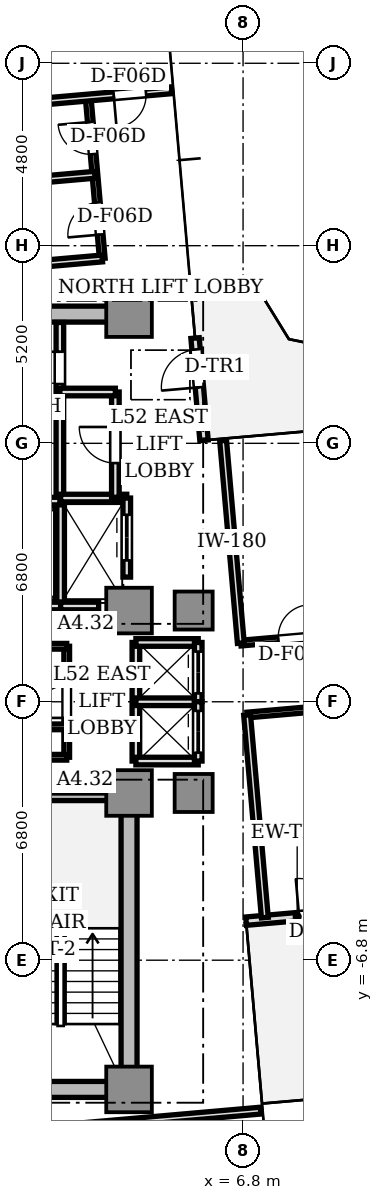
"""IFC4 building model, lengths in metres.
Left out: names, types, materials, properties, quantities, classifications, styles, units other than length and angle.
Written with IfcOpenShell. Run it as: python <this file> out.ifc"""

import sys

from ifc_helpers import new_model, si_unit, direction, frame, frame_2d, origin, origin_2d, place, context, subcontext, project, spatial, rectangle, extrude, source, transform, mapped, element, fill, save


model = new_model("IFC4")
c1 = context("Model", 3, precision=1e-05, world=origin(), true_north=direction((0.0, 1.0)))
c2 = subcontext(c1, "Body", "Model", "MODEL_VIEW")
j1 = project(units=[si_unit("LENGTHUNIT", "METRE"), si_unit("PLANEANGLEUNIT", "RADIAN")], contexts=[c1])
p1 = place(None, origin())
s1 = spatial("IfcSite", under=j1, at=p1, CompositionType="ELEMENT")
p2 = place(p1, origin())
s2 = spatial("IfcBuilding", under=s1, at=p2, CompositionType="ELEMENT")
p3 = place(p2, frame((0.0, 0.0, 188.6)))
s3 = spatial("IfcBuildingStorey", under=s2, at=p3, CompositionType="ELEMENT", Elevation=188.6)
for number, where, z_axis, x_axis in (
    (1, (-3.55, 10.2, 0.0), (0.0, 0.0, 1.0), (1.0, 0.0, 0.0)),
    (2, (-3.55, -10.2, 0.0), (0.0, 0.0, 1.0), (1.0, 0.0, 0.0)),
):
    element("IfcWall", number, at=place(p3, frame(where, z_axis=z_axis, x_axis=x_axis)), inside=s3, PredefinedType="SHEAR", context=c2, shape_type="SweptSolid", body=[
        extrude(rectangle(XDim=7.1, YDim=0.42, at=frame_2d((3.55, 0.0))), origin(), (0.0, 0.0, 1.0), 3.11),
    ])
p4 = place(p3, frame((3.8, -9.75, 0.0), z_axis=(0.0, 0.0, 1.0), x_axis=(0.0, 1.0, 0.0)))
e3 = element("IfcWall", 3, at=p4, inside=s3, PredefinedType="SHEAR", context=c2, shape_type="SweptSolid", body=[
    extrude(rectangle(XDim=6.9, YDim=0.42, at=frame_2d((3.45, 0.0))), origin(), (0.0, 0.0, 1.0), 3.11),
])
m1 = source(origin(), c2, "Body", "SweptSolid", [
    extrude(rectangle(XDim=1.2, YDim=1.2, at=origin_2d()), origin(), (0.0, 0.0, 1.0), 3.11),
])
for number, where, z_axis, x_axis in (
    (4, (3.8, 2.4, 0.0), (0.0, 0.0, 1.0), (1.0, 0.0, 0.0)),
    (5, (3.8, 10.2, 0.0), (0.0, 0.0, 1.0), (1.0, 0.0, 0.0)),
    (6, (3.8, -2.4, 0.0), (0.0, 0.0, 1.0), (1.0, 0.0, 0.0)),
    (7, (3.8, -10.2, 0.0), (0.0, 0.0, 1.0), (1.0, 0.0, 0.0)),
):
    element("IfcColumn", number, at=place(p3, frame(where, z_axis=z_axis, x_axis=x_axis)), inside=s3, PredefinedType="COLUMN", context=c2, shape_type="MappedRepresentation", body=[
        mapped(m1, transform((0.0, 0.0, 0.0), scale=1.0)),
    ])
m2 = source(origin(), c2, "Body", "SweptSolid", [
    extrude(rectangle(XDim=1.0, YDim=1.0, at=origin_2d()), origin(), (0.0, 0.0, 1.0), 3.11),
])
for number, where, z_axis, x_axis in (
    (8, (5.5, 2.4, 0.0), (0.0, 0.0, 1.0), (1.0, 0.0, 0.0)),
    (9, (5.5, -2.4, 0.0), (0.0, 0.0, 1.0), (1.0, 0.0, 0.0)),
):
    element("IfcColumn", number, at=place(p3, frame(where, z_axis=z_axis, x_axis=x_axis)), inside=s3, PredefinedType="COLUMN", context=c2, shape_type="MappedRepresentation", body=[
        mapped(m2, transform((0.0, 0.0, 0.0), scale=1.0)),
    ])
p5 = place(p3, frame((6.879, -5.772, 0.0), z_axis=(0.0, 0.0, 1.0), x_axis=(0.996193619346, 0.087168071984, 0.0)))
e10 = element("IfcWall", 10, at=p5, inside=s3, PredefinedType="STANDARD", context=c2, shape_type="SweptSolid", body=[
    extrude(rectangle(XDim=2.7, YDim=0.22, at=frame_2d((1.35, 0.0))), origin(), (0.0, 0.0, 1.0), 3.11),
])
p6 = place(p5, frame((1.4, 0.0, 0.0)))
e11 = element("IfcOpeningElement", 11, at=p6, cuts=e10, PredefinedType="OPENING", context=c2, shape_type="SweptSolid", body=[
    extrude(rectangle(XDim=1.0, YDim=2.2, at=frame_2d((0.5, 1.1))), frame((0.0, 0.12, 0.0), z_axis=(0.0, -1.0, 0.0), x_axis=(1.0, 0.0, 0.0)), (0.0, 0.0, 1.0), 0.24),
])
p7 = place(p3, frame((5.772, 6.879, 0.0), z_axis=(0.0, 0.0, 1.0), x_axis=(-0.087168071984, 0.996193619346, 0.0)))
e12 = element("IfcWall", 12, at=p7, inside=s3, PredefinedType="STANDARD", context=c2, shape_type="SweptSolid", body=[
    extrude(rectangle(XDim=2.7, YDim=0.22, at=frame_2d((1.35, 0.0))), origin(), (0.0, 0.0, 1.0), 3.11),
])
p8 = place(p7, frame((1.4, 0.0, 0.0)))
e13 = element("IfcOpeningElement", 13, at=p8, cuts=e12, PredefinedType="OPENING", context=c2, shape_type="SweptSolid", body=[
    extrude(rectangle(XDim=1.0, YDim=2.2, at=frame_2d((0.5, 1.1))), frame((0.0, 0.12, 0.0), z_axis=(0.0, -1.0, 0.0), x_axis=(1.0, 0.0, 0.0)), (0.0, 0.0, 1.0), 0.24),
])
p9 = place(p3, frame((0.0, -2.5, 0.0), z_axis=(0.0, 0.0, 1.0), x_axis=(1.0, 0.0, 0.0)))
e14 = element("IfcWall", 14, at=p9, inside=s3, PredefinedType="SOLIDWALL", context=c2, shape_type="SweptSolid", body=[
    extrude(rectangle(XDim=3.72, YDim=0.2, at=frame_2d((1.86, 0.0))), origin(), (0.0, 0.0, 1.0), 3.11),
])
p10 = place(p3, frame((1.98, 5.32, 0.0), z_axis=(0.0, 0.0, 1.0), x_axis=(0.0, 1.0, 0.0)))
e15 = element("IfcWall", 15, at=p10, inside=s3, PredefinedType="SOLIDWALL", context=c2, shape_type="SweptSolid", body=[
    extrude(rectangle(XDim=4.66, YDim=0.2, at=frame_2d((2.33, 0.0))), origin(), (0.0, 0.0, 1.0), 2.66),
])
p11 = place(p10, frame((3.04, 0.0, 0.0)))
e16 = element("IfcOpeningElement", 16, at=p11, cuts=e15, PredefinedType="OPENING", context=c2, shape_type="SweptSolid", body=[
    extrude(rectangle(XDim=0.85, YDim=2.1, at=frame_2d((0.425, 1.05))), frame((0.0, 0.11, 0.0), z_axis=(0.0, -1.0, 0.0), x_axis=(1.0, 0.0, 0.0)), (0.0, 0.0, 1.0), 0.22),
])
p12 = place(p3, frame((2.0, 2.5, 0.0), z_axis=(0.0, 0.0, 1.0), x_axis=(0.0, 1.0, 0.0)))
e17 = element("IfcWall", 17, at=p12, inside=s3, PredefinedType="SOLIDWALL", context=c2, shape_type="SweptSolid", body=[
    extrude(rectangle(XDim=2.78, YDim=0.2, at=frame_2d((1.39, 0.0))), origin(), (0.0, 0.0, 1.0), 2.66),
])
p13 = place(p3, frame((0.05, 2.52, 0.0), z_axis=(0.0, 0.0, 1.0), x_axis=(1.0, 0.0, 0.0)))
e18 = element("IfcWall", 18, at=p13, inside=s3, PredefinedType="SOLIDWALL", context=c2, shape_type="SweptSolid", body=[
    extrude(rectangle(XDim=1.95, YDim=0.2, at=frame_2d((0.975, 0.0))), origin(), (0.0, 0.0, 1.0), 2.66),
])
p14 = place(p3, frame((0.05, 5.28, 0.0), z_axis=(0.0, 0.0, 1.0), x_axis=(1.0, 0.0, 0.0)))
e19 = element("IfcWall", 19, at=p14, inside=s3, PredefinedType="SOLIDWALL", context=c2, shape_type="SweptSolid", body=[
    extrude(rectangle(XDim=1.93, YDim=0.2, at=frame_2d((0.965, 0.0))), origin(), (0.0, 0.0, 1.0), 2.66),
])
p15 = place(p14, frame((0.4, 0.0, 0.0)))
e20 = element("IfcOpeningElement", 20, at=p15, cuts=e19, PredefinedType="OPENING", context=c2, shape_type="SweptSolid", body=[
    extrude(rectangle(XDim=1.1, YDim=2.2, at=frame_2d((0.55, 1.1))), frame((0.0, 0.11, 0.0), z_axis=(0.0, -1.0, 0.0), x_axis=(1.0, 0.0, 0.0)), (0.0, 0.0, 1.0), 0.22),
])
p16 = place(p3, frame((2.0, 2.52, 0.0), z_axis=(0.0, 0.0, 1.0), x_axis=(1.0, 0.0, 0.0)))
e21 = element("IfcWall", 21, at=p16, inside=s3, PredefinedType="SOLIDWALL", context=c2, shape_type="SweptSolid", body=[
    extrude(rectangle(XDim=1.0, YDim=0.2, at=frame_2d((0.5, 0.0))), origin(), (0.0, 0.0, 1.0), 2.66),
])
p17 = place(p3, frame((2.0, 5.36, 0.0), z_axis=(0.0, 0.0, 1.0), x_axis=(1.0, 0.0, 0.0)))
e22 = element("IfcWall", 22, at=p17, inside=s3, PredefinedType="SOLIDWALL", context=c2, shape_type="SweptSolid", body=[
    extrude(rectangle(XDim=1.74, YDim=0.2, at=frame_2d((0.87, 0.0))), origin(), (0.0, 0.0, 1.0), 2.66),
])
p18 = place(p3, frame((3.74, 3.28, 0.0), z_axis=(0.0, 0.0, 1.0), x_axis=(0.0, 1.0, 0.0)))
e23 = element("IfcWall", 23, at=p18, inside=s3, PredefinedType="SOLIDWALL", context=c2, shape_type="SweptSolid", body=[
    extrude(rectangle(XDim=2.08, YDim=0.2, at=frame_2d((1.04, 0.0))), origin(), (0.0, 0.0, 1.0), 2.66),
])
p19 = place(p18, frame((0.44, 0.0, 0.0)))
e24 = element("IfcOpeningElement", 24, at=p19, cuts=e23, PredefinedType="OPENING", context=c2, shape_type="SweptSolid", body=[
    extrude(rectangle(XDim=1.2, YDim=2.2, at=frame_2d((0.6, 1.1))), frame((0.0, 0.11, 0.0), z_axis=(0.0, -1.0, 0.0), x_axis=(1.0, 0.0, 0.0)), (0.0, 0.0, 1.0), 0.22),
])
p20 = place(p3, frame((3.98, -1.56, 0.0), z_axis=(0.0, 0.0, 1.0), x_axis=(0.0, 1.0, 0.0)))
e25 = element("IfcWall", 25, at=p20, inside=s3, PredefinedType="SOLIDWALL", context=c2, shape_type="SweptSolid", body=[
    extrude(rectangle(XDim=3.12, YDim=0.2, at=frame_2d((1.56, 0.0))), origin(), (0.0, 0.0, 1.0), 2.28),
])
for number, where, z_axis, x_axis in (
    (26, (3.98, 1.56, 0.0), (0.0, 0.0, 1.0), (1.0, 0.0, 0.0)),
    (27, (3.98, -1.56, 0.0), (0.0, 0.0, 1.0), (1.0, 0.0, 0.0)),
    (28, (3.98, 0.0, 0.0), (0.0, 0.0, 1.0), (1.0, 0.0, 0.0)),
):
    element("IfcWall", number, at=place(p3, frame(where, z_axis=z_axis, x_axis=x_axis)), inside=s3, PredefinedType="SOLIDWALL", context=c2, shape_type="SweptSolid", body=[
        extrude(rectangle(XDim=1.64, YDim=0.2, at=frame_2d((0.82, 0.0))), origin(), (0.0, 0.0, 1.0), 2.66),
    ])
p21 = place(p3, frame((5.62, 0.0, 0.0), z_axis=(0.0, 0.0, 1.0), x_axis=(0.0, 1.0, 0.0)))
e29 = element("IfcWall", 29, at=p21, inside=s3, PredefinedType="SOLIDWALL", context=c2, shape_type="SweptSolid", body=[
    extrude(rectangle(XDim=1.56, YDim=0.2, at=frame_2d((0.78, 0.0))), origin(), (0.0, 0.0, 1.0), 2.66),
])
p22 = place(p21, frame((0.22, 0.0, 0.0)))
e30 = element("IfcOpeningElement", 30, at=p22, cuts=e29, PredefinedType="OPENING", context=c2, shape_type="SweptSolid", body=[
    extrude(rectangle(XDim=1.1, YDim=2.2, at=frame_2d((0.55, 1.1))), frame((0.0, 0.11, 0.0), z_axis=(0.0, -1.0, 0.0), x_axis=(1.0, 0.0, 0.0)), (0.0, 0.0, 1.0), 0.22),
])
p23 = place(p3, frame((5.62, -1.56, 0.0), z_axis=(0.0, 0.0, 1.0), x_axis=(0.0, 1.0, 0.0)))
e31 = element("IfcWall", 31, at=p23, inside=s3, PredefinedType="SOLIDWALL", context=c2, shape_type="SweptSolid", body=[
    extrude(rectangle(XDim=1.56, YDim=0.2, at=frame_2d((0.78, 0.0))), origin(), (0.0, 0.0, 1.0), 2.66),
])
p24 = place(p23, frame((0.22, 0.0, 0.0)))
e32 = element("IfcOpeningElement", 32, at=p24, cuts=e31, PredefinedType="OPENING", context=c2, shape_type="SweptSolid", body=[
    extrude(rectangle(XDim=1.1, YDim=2.2, at=frame_2d((0.55, 1.1))), frame((0.0, 0.11, 0.0), z_axis=(0.0, -1.0, 0.0), x_axis=(1.0, 0.0, 0.0)), (0.0, 0.0, 1.0), 0.22),
])
p25 = place(p3, frame((3.44, 5.38, 0.0), z_axis=(0.0, 0.0, 1.0), x_axis=(0.0, 1.0, 0.0)))
e33 = element("IfcWall", 33, at=p25, inside=s3, PredefinedType="SOLIDWALL", context=c2, shape_type="SweptSolid", body=[
    extrude(rectangle(XDim=2.77, YDim=0.2, at=frame_2d((1.385, 0.0))), origin(), (0.0, 0.0, 1.0), 2.66),
])
p26 = place(p25, frame((0.9, 0.0, 0.0)))
e34 = element("IfcOpeningElement", 34, at=p26, cuts=e33, PredefinedType="OPENING", context=c2, shape_type="SweptSolid", body=[
    extrude(rectangle(XDim=0.95, YDim=2.15, at=frame_2d((0.475, 1.075))), frame((0.0, 0.11, 0.0), z_axis=(0.0, -1.0, 0.0), x_axis=(1.0, 0.0, 0.0)), (0.0, 0.0, 1.0), 0.22),
])
p27 = place(p3, frame((1.98, 8.15, 0.0), z_axis=(0.0, 0.0, 1.0), x_axis=(1.0, 0.0, 0.0)))
e35 = element("IfcWall", 35, at=p27, inside=s3, PredefinedType="SOLIDWALL", context=c2, shape_type="SweptSolid", body=[
    extrude(rectangle(XDim=1.46, YDim=0.2, at=frame_2d((0.73, 0.0))), origin(), (0.0, 0.0, 1.0), 2.66),
])
p28 = place(p3, frame((2.16, -1.46, 0.0), z_axis=(0.0, 0.0, 1.0), x_axis=(0.0, 1.0, 0.0)))
e36 = element("IfcWall", 36, at=p28, inside=s3, PredefinedType="PARTITIONING", context=c2, shape_type="SweptSolid", body=[
    extrude(rectangle(XDim=2.92, YDim=0.15, at=frame_2d((1.46, 0.0))), origin(), (0.0, 0.0, 1.0), 2.66),
])
p29 = place(p28, frame((1.035, 0.0, 0.0)))
e37 = element("IfcOpeningElement", 37, at=p29, cuts=e36, PredefinedType="OPENING", context=c2, shape_type="SweptSolid", body=[
    extrude(rectangle(XDim=0.85, YDim=2.1, at=frame_2d((0.425, 1.05))), frame((0.0, 0.085, 0.0), z_axis=(0.0, -1.0, 0.0), x_axis=(1.0, 0.0, 0.0)), (0.0, 0.0, 1.0), 0.17),
])
p30 = place(p3, frame((-2.16, 1.46, 0.0), z_axis=(0.0, 0.0, 1.0), x_axis=(1.0, 0.0, 0.0)))
e38 = element("IfcWall", 38, at=p30, inside=s3, PredefinedType="PARTITIONING", context=c2, shape_type="SweptSolid", body=[
    extrude(rectangle(XDim=4.32, YDim=0.15, at=frame_2d((2.16, 0.0))), origin(), (0.0, 0.0, 1.0), 2.66),
])
p31 = place(p30, frame((1.73, 0.0, 0.0)))
e39 = element("IfcOpeningElement", 39, at=p31, cuts=e38, PredefinedType="OPENING", context=c2, shape_type="SweptSolid", body=[
    extrude(rectangle(XDim=0.85, YDim=2.1, at=frame_2d((0.425, 1.05))), frame((0.0, 0.085, 0.0), z_axis=(0.0, -1.0, 0.0), x_axis=(1.0, 0.0, 0.0)), (0.0, 0.0, 1.0), 0.17),
])
p32 = place(p3, frame((-2.16, -1.46, 0.0), z_axis=(0.0, 0.0, 1.0), x_axis=(1.0, 0.0, 0.0)))
e40 = element("IfcWall", 40, at=p32, inside=s3, PredefinedType="PARTITIONING", context=c2, shape_type="SweptSolid", body=[
    extrude(rectangle(XDim=4.32, YDim=0.15, at=frame_2d((2.16, 0.0))), origin(), (0.0, 0.0, 1.0), 2.66),
])
p33 = place(p32, frame((1.73, 0.0, 0.0)))
e41 = element("IfcOpeningElement", 41, at=p33, cuts=e40, PredefinedType="OPENING", context=c2, shape_type="SweptSolid", body=[
    extrude(rectangle(XDim=0.85, YDim=2.1, at=frame_2d((0.425, 1.05))), frame((0.0, 0.085, 0.0), z_axis=(0.0, -1.0, 0.0), x_axis=(1.0, 0.0, 0.0)), (0.0, 0.0, 1.0), 0.17),
])
for number, where, z_axis, x_axis in (
    (42, (-2.16, 0.66, 0.0), (0.0, 0.0, 1.0), (1.0, 0.0, 0.0)),
    (43, (-2.16, -0.66, 0.0), (0.0, 0.0, 1.0), (1.0, 0.0, 0.0)),
):
    element("IfcWall", number, at=place(p3, frame(where, z_axis=z_axis, x_axis=x_axis)), inside=s3, PredefinedType="PARTITIONING", context=c2, shape_type="SweptSolid", body=[
        extrude(rectangle(XDim=4.32, YDim=0.15, at=frame_2d((2.16, 0.0))), origin(), (0.0, 0.0, 1.0), 2.66),
    ])
p34 = place(p3, frame((6.741, 1.543, 0.0), z_axis=(0.0, 0.0, 1.0), x_axis=(0.996195062465, 0.087151577845, 0.0)))
e44 = element("IfcWall", 44, at=p34, inside=s3, PredefinedType="PARTITIONING", context=c2, shape_type="SweptSolid", body=[
    extrude(rectangle(XDim=13.2, YDim=0.15, at=frame_2d((6.6, 0.0))), origin(), (0.0, 0.0, 1.0), 2.66),
])
p35 = place(p34, frame((0.992, 0.0, 0.0)))
e45 = element("IfcOpeningElement", 45, at=p35, cuts=e44, PredefinedType="OPENING", context=c2, shape_type="SweptSolid", body=[
    extrude(rectangle(XDim=0.85, YDim=2.1, at=frame_2d((0.425, 1.05))), frame((0.0, 0.085, 0.0), z_axis=(0.0, -1.0, 0.0), x_axis=(1.0, 0.0, 0.0)), (0.0, 0.0, 1.0), 0.17),
])
p36 = place(p34, frame((7.342, 0.0, 0.0)))
e46 = element("IfcOpeningElement", 46, at=p36, cuts=e44, PredefinedType="OPENING", context=c2, shape_type="SweptSolid", body=[
    extrude(rectangle(XDim=0.85, YDim=2.1, at=frame_2d((0.425, 1.05))), frame((0.0, 0.085, 0.0), z_axis=(0.0, -1.0, 0.0), x_axis=(1.0, 0.0, 0.0)), (0.0, 0.0, 1.0), 0.17),
])
p37 = place(p3, frame((6.907, -0.349, 0.0), z_axis=(0.0, 0.0, 1.0), x_axis=(0.996195062465, 0.087151577845, 0.0)))
e47 = element("IfcWall", 47, at=p37, inside=s3, PredefinedType="PARTITIONING", context=c2, shape_type="SweptSolid", body=[
    extrude(rectangle(XDim=13.2, YDim=0.15, at=frame_2d((6.6, 0.0))), origin(), (0.0, 0.0, 1.0), 2.66),
])
p38 = place(p37, frame((2.458, 0.0, 0.0)))
e48 = element("IfcOpeningElement", 48, at=p38, cuts=e47, PredefinedType="OPENING", context=c2, shape_type="SweptSolid", body=[
    extrude(rectangle(XDim=0.85, YDim=2.1, at=frame_2d((0.425, 1.05))), frame((0.0, 0.085, 0.0), z_axis=(0.0, -1.0, 0.0), x_axis=(1.0, 0.0, 0.0)), (0.0, 0.0, 1.0), 0.17),
])
p39 = place(p37, frame((9.308, 0.0, 0.0)))
e49 = element("IfcOpeningElement", 49, at=p39, cuts=e47, PredefinedType="OPENING", context=c2, shape_type="SweptSolid", body=[
    extrude(rectangle(XDim=0.85, YDim=2.1, at=frame_2d((0.425, 1.05))), frame((0.0, 0.085, 0.0), z_axis=(0.0, -1.0, 0.0), x_axis=(1.0, 0.0, 0.0)), (0.0, 0.0, 1.0), 0.17),
])
for number, where, z_axis, x_axis in (
    (50, (6.741, 1.543, 0.0), (0.0, 0.0, 1.0), (-0.087, 0.996, 0.0)),
    (51, (7.373, -5.679, 0.0), (0.0, 0.0, 1.0), (-0.087, 0.996, 0.0)),
):
    element("IfcWall", number, at=place(p3, frame(where, z_axis=z_axis, x_axis=x_axis)), inside=s3, PredefinedType="PARTITIONING", context=c2, shape_type="SweptSolid", body=[
        extrude(rectangle(XDim=5.35, YDim=0.18, at=frame_2d((2.675, 0.0))), origin(), (0.0, 0.0, 1.0), 2.66),
    ])
p40 = place(p3, frame((3.095, 11.664, 0.0), z_axis=(0.0, 0.0, 1.0), x_axis=(-0.087142722004, 0.996195837173, 0.0)))
e52 = element("IfcWall", 52, at=p40, inside=s3, PredefinedType="PARTITIONING", context=c2, shape_type="SweptSolid", body=[
    extrude(rectangle(XDim=4.25, YDim=0.15, at=frame_2d((2.125, 0.0))), origin(), (0.0, 0.0, 1.0), 2.66),
])
p41 = place(p40, frame((0.63, 0.0, 0.0)))
e53 = element("IfcOpeningElement", 53, at=p41, cuts=e52, PredefinedType="OPENING", context=c2, shape_type="SweptSolid", body=[
    extrude(rectangle(XDim=0.85, YDim=2.1, at=frame_2d((0.425, 1.05))), frame((0.0, 0.085, 0.0), z_axis=(0.0, -1.0, 0.0), x_axis=(1.0, 0.0, 0.0)), (0.0, 0.0, 1.0), 0.17),
])
p42 = place(p40, frame((2.755, 0.0, 0.0)))
e54 = element("IfcOpeningElement", 54, at=p42, cuts=e52, PredefinedType="OPENING", context=c2, shape_type="SweptSolid", body=[
    extrude(rectangle(XDim=0.85, YDim=2.1, at=frame_2d((0.425, 1.05))), frame((0.0, 0.085, 0.0), z_axis=(0.0, -1.0, 0.0), x_axis=(1.0, 0.0, 0.0)), (0.0, 0.0, 1.0), 0.17),
])
p43 = place(p3, frame((3.095, 11.664, 0.0), z_axis=(0.0, 0.0, 1.0), x_axis=(-0.996196061386, -0.087140158824, 0.0)))
e55 = element("IfcWall", 55, at=p43, inside=s3, PredefinedType="PARTITIONING", context=c2, shape_type="SweptSolid", body=[
    extrude(rectangle(XDim=10.4, YDim=0.18, at=frame_2d((5.2, 0.0))), origin(), (0.0, 0.0, 1.0), 2.66),
])
p44 = place(p3, frame((2.903, 13.866, 0.0), z_axis=(0.0, 0.0, 1.0), x_axis=(-0.996194201607, -0.087161417409, 0.0)))
e56 = element("IfcWall", 56, at=p44, inside=s3, PredefinedType="PARTITIONING", context=c2, shape_type="SweptSolid", body=[
    extrude(rectangle(XDim=10.4, YDim=0.18, at=frame_2d((5.2, 0.0))), origin(), (0.0, 0.0, 1.0), 2.66),
])
p45 = place(p3, frame((4.917, 16.09, 0.0), z_axis=(0.0, 0.0, 1.0), x_axis=(-0.996196619285, -0.087133780622, 0.0)))
e57 = element("IfcWall", 57, at=p45, inside=s3, PredefinedType="PARTITIONING", context=c2, shape_type="SweptSolid", body=[
    extrude(rectangle(XDim=12.6, YDim=0.18, at=frame_2d((6.3, 0.0))), origin(), (0.0, 0.0, 1.0), 2.66),
])
p46 = place(p45, frame((0.675, 0.0, 0.0)))
e58 = element("IfcOpeningElement", 58, at=p46, cuts=e57, PredefinedType="OPENING", context=c2, shape_type="SweptSolid", body=[
    extrude(rectangle(XDim=0.85, YDim=2.1, at=frame_2d((0.425, 1.05))), frame((0.0, 0.1, 0.0), z_axis=(0.0, -1.0, 0.0), x_axis=(1.0, 0.0, 0.0)), (0.0, 0.0, 1.0), 0.2),
])
p47 = place(p3, frame((1.936, -11.224, 0.0), z_axis=(0.0, 0.0, 1.0), x_axis=(0.996194212812, 0.087161289348, 0.0)))
e59 = element("IfcWall", 59, at=p47, inside=s3, PredefinedType="PARTITIONING", context=c2, shape_type="SweptSolid", body=[
    extrude(rectangle(XDim=5.35, YDim=0.18, at=frame_2d((2.675, 0.0))), origin(), (0.0, 0.0, 1.0), 2.66),
])
m3 = source(origin(), c2, "Body", "SweptSolid", [
    extrude(rectangle(XDim=1.0, YDim=0.05, at=origin_2d()), origin(), (0.0, 0.0, 1.0), 2.2),
])
p48 = place(p6, frame((0.5, 0.0, 0.0)))
e60 = element("IfcDoor", 60, at=p48, inside=s3, OperationType="SINGLE_SWING_LEFT", PredefinedType="DOOR", context=c2, shape_type="MappedRepresentation", body=[
    mapped(m3, transform((0.0, 0.0, 0.0), scale=1.0)),
])
fill(e11, e60)
p49 = place(p8, frame((0.5, 0.0, 0.0)))
e61 = element("IfcDoor", 61, at=p49, inside=s3, OperationType="SINGLE_SWING_LEFT", PredefinedType="DOOR", context=c2, shape_type="MappedRepresentation", body=[
    mapped(m3, transform((0.0, 0.0, 0.0), scale=1.0)),
])
fill(e13, e61)
m4 = source(origin(), c2, "Body", "SweptSolid", [
    extrude(rectangle(XDim=0.85, YDim=0.05, at=origin_2d()), origin(), (0.0, 0.0, 1.0), 2.1),
])
p50 = place(p11, frame((0.425, 0.0, 0.0)))
e62 = element("IfcDoor", 62, at=p50, inside=s3, OperationType="SINGLE_SWING_RIGHT", PredefinedType="DOOR", context=c2, shape_type="MappedRepresentation", body=[
    mapped(m4, transform((0.0, 0.0, 0.0), scale=1.0)),
])
fill(e16, e62)
m5 = source(origin(), c2, "Body", "SweptSolid", [
    extrude(rectangle(XDim=1.2, YDim=0.05, at=origin_2d()), origin(), (0.0, 0.0, 1.0), 2.2),
])
p51 = place(p19, frame((0.6, 0.0, 0.0)))
e63 = element("IfcDoor", 63, at=p51, inside=s3, OperationType="DOUBLE_DOOR_SLIDING", PredefinedType="DOOR", context=c2, shape_type="MappedRepresentation", body=[
    mapped(m5, transform((0.0, 0.0, 0.0), scale=1.0)),
])
fill(e24, e63)
m6 = source(origin(), c2, "Body", "SweptSolid", [
    extrude(rectangle(XDim=1.1, YDim=0.05, at=origin_2d()), origin(), (0.0, 0.0, 1.0), 2.2),
])
p52 = place(p22, frame((0.55, 0.0, 0.0)))
e64 = element("IfcDoor", 64, at=p52, inside=s3, OperationType="DOUBLE_DOOR_SLIDING", PredefinedType="DOOR", context=c2, shape_type="MappedRepresentation", body=[
    mapped(m6, transform((0.0, 0.0, 0.0), scale=1.0)),
])
fill(e30, e64)
p53 = place(p24, frame((0.55, 0.0, 0.0)))
e65 = element("IfcDoor", 65, at=p53, inside=s3, OperationType="DOUBLE_DOOR_SLIDING", PredefinedType="DOOR", context=c2, shape_type="MappedRepresentation", body=[
    mapped(m6, transform((0.0, 0.0, 0.0), scale=1.0)),
])
fill(e32, e65)
m7 = source(origin(), c2, "Body", "SweptSolid", [
    extrude(rectangle(XDim=0.95, YDim=0.05, at=origin_2d()), origin(), (0.0, 0.0, 1.0), 2.15),
])
p54 = place(p26, frame((0.475, 0.0, 0.0)))
e66 = element("IfcDoor", 66, at=p54, inside=s3, OperationType="SINGLE_SWING_RIGHT", PredefinedType="DOOR", context=c2, shape_type="MappedRepresentation", body=[
    mapped(m7, transform((0.0, 0.0, 0.0), scale=1.0)),
])
fill(e34, e66)
p55 = place(p29, frame((0.425, 0.0, 0.0)))
e67 = element("IfcDoor", 67, at=p55, inside=s3, OperationType="SINGLE_SWING_LEFT", PredefinedType="DOOR", context=c2, shape_type="MappedRepresentation", body=[
    mapped(m4, transform((0.0, 0.0, 0.0), scale=1.0)),
])
fill(e37, e67)
p56 = place(p35, frame((0.425, 0.0, 0.0)))
e68 = element("IfcDoor", 68, at=p56, inside=s3, OperationType="SINGLE_SWING_RIGHT", PredefinedType="DOOR", context=c2, shape_type="MappedRepresentation", body=[
    mapped(m4, transform((0.0, 0.0, 0.0), scale=1.0)),
])
fill(e45, e68)
p57 = place(p41, frame((0.425, 0.0, 0.0)))
e69 = element("IfcDoor", 69, at=p57, inside=s3, OperationType="SINGLE_SWING_LEFT", PredefinedType="DOOR", context=c2, shape_type="MappedRepresentation", body=[
    mapped(m4, transform((0.0, 0.0, 0.0), scale=1.0)),
])
fill(e53, e69)
p58 = place(p42, frame((0.425, 0.0, 0.0)))
e70 = element("IfcDoor", 70, at=p58, inside=s3, OperationType="SINGLE_SWING_RIGHT", PredefinedType="DOOR", context=c2, shape_type="MappedRepresentation", body=[
    mapped(m4, transform((0.0, 0.0, 0.0), scale=1.0)),
])
fill(e54, e70)
p59 = place(p46, frame((0.425, 0.0, 0.0)))
e71 = element("IfcDoor", 71, at=p59, inside=s3, OperationType="SINGLE_SWING_RIGHT", PredefinedType="DOOR", context=c2, shape_type="MappedRepresentation", body=[
    mapped(m4, transform((0.0, 0.0, 0.0), scale=1.0)),
])
fill(e58, e71)
save(model, sys.argv[1])
